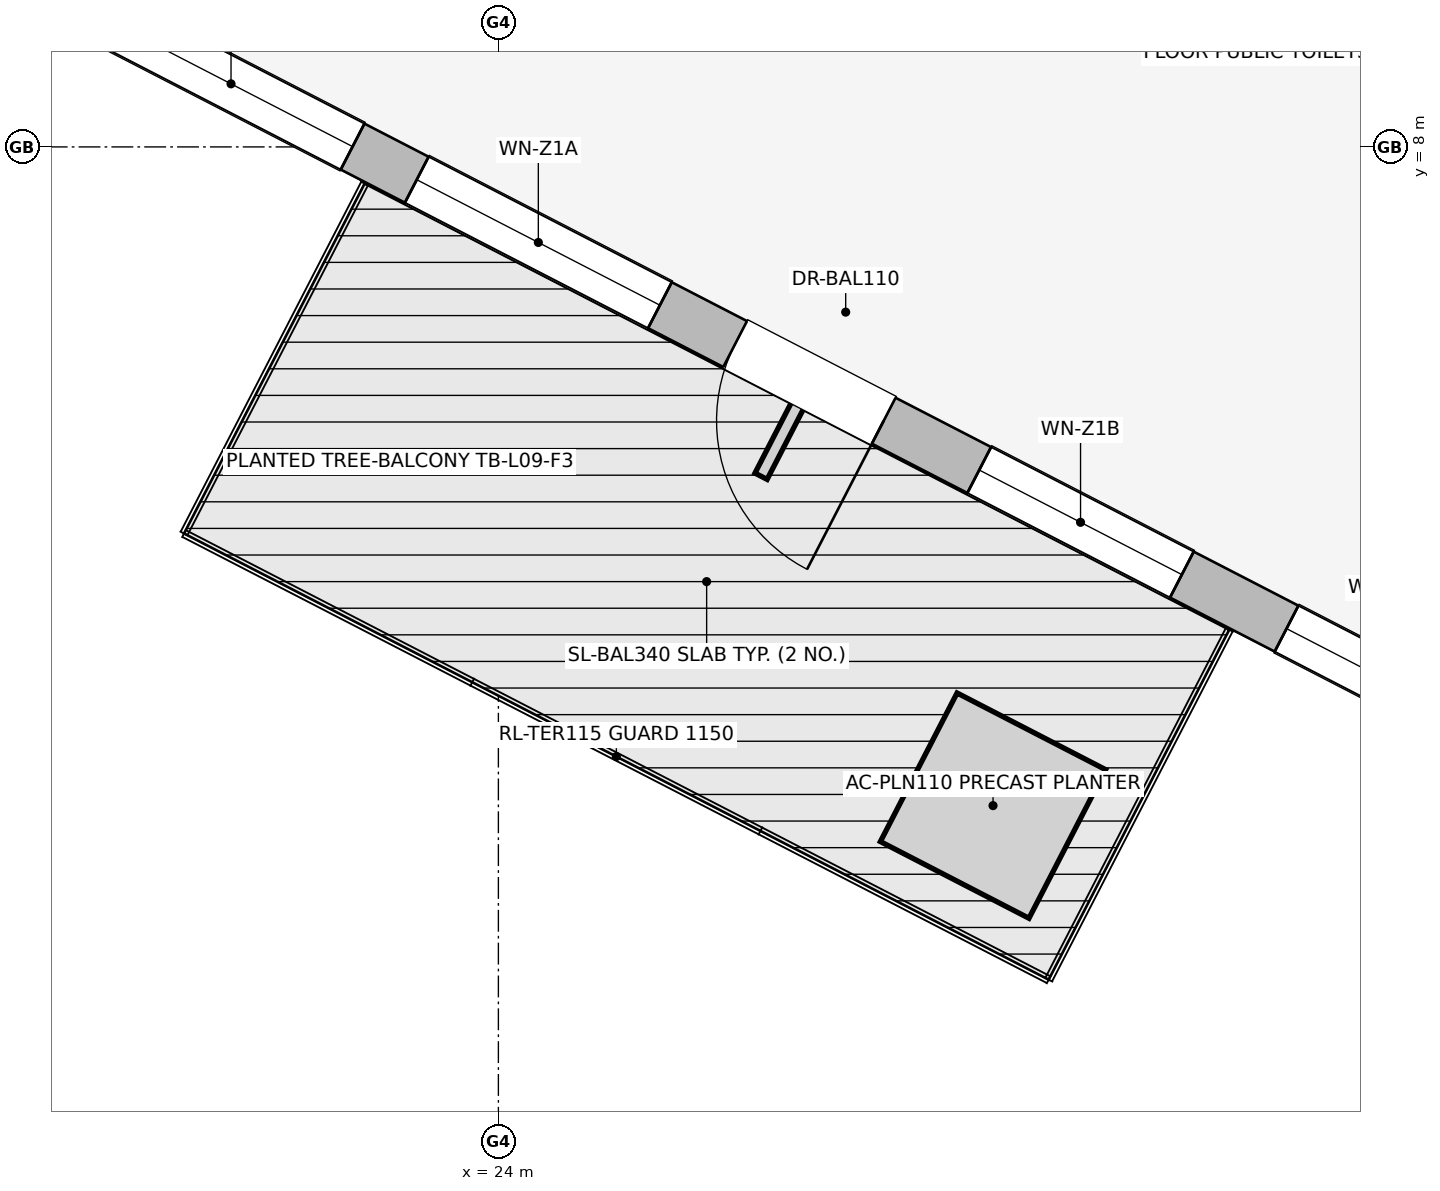
"""IFC4 building model, lengths in metres.
Left out: names, types, materials, properties, quantities, classifications, styles, units other than length and angle.
Written with IfcOpenShell. Run it as: python <this file> out.ifc"""

import sys

from ifc_helpers import new_model, si_unit, direction, frame, frame_2d, origin, place, context, subcontext, project, spatial, rectangle, extrude, element, fill, save


model = new_model("IFC4")
c1 = context("Model", 3, precision=1e-05, world=origin(), true_north=direction((0.0, 1.0)))
c2 = subcontext(c1, "Body", "Model", "MODEL_VIEW")
j1 = project(units=[si_unit("LENGTHUNIT", "METRE"), si_unit("PLANEANGLEUNIT", "RADIAN")], contexts=[c1])
p1 = place(None, origin())
s1 = spatial("IfcSite", under=j1, at=p1, CompositionType="ELEMENT")
p2 = place(p1, origin())
s2 = spatial("IfcBuilding", under=s1, at=p2, CompositionType="ELEMENT")
p3 = place(p2, frame((0.0, 0.0, 37.95)))
s3 = spatial("IfcBuildingStorey", under=s2, at=p3, CompositionType="ELEMENT", Elevation=37.95)
p4 = place(p3, frame((35.169, 1.743, 0.0), z_axis=(0.0, 0.0, 1.0), x_axis=(-0.888634413993, 0.458616264721, 0.0)))
e1 = element("IfcWall", 1, at=p4, inside=s3, PredefinedType="STANDARD", context=c2, shape_type="SweptSolid", body=[
    extrude(rectangle(XDim=20.531, YDim=0.34, at=frame_2d((10.266, 0.0))), origin(), (0.0, 0.0, 1.0), 2.684),
])
p5 = place(p4, frame((9.716, 0.0, 0.0)))
e2 = element("IfcOpeningElement", 2, at=p5, cuts=e1, PredefinedType="OPENING", context=c2, shape_type="SweptSolid", body=[
    extrude(rectangle(XDim=1.1, YDim=2.04, at=frame_2d((0.55, 1.02))), frame((0.0, 0.18, 0.0), z_axis=(0.0, -1.0, 0.0), x_axis=(1.0, 0.0, 0.0)), (0.0, 0.0, 1.0), 0.36),
])
p6 = place(p4, frame((0.902, 0.0, 0.75)))
e3 = element("IfcOpeningElement", 3, at=p6, cuts=e1, PredefinedType="OPENING", context=c2, shape_type="SweptSolid", body=[
    extrude(rectangle(XDim=1.05, YDim=1.4, at=frame_2d((0.525, 0.7))), frame((0.0, 0.18, 0.0), z_axis=(0.0, -1.0, 0.0), x_axis=(1.0, 0.0, 0.0)), (0.0, 0.0, 1.0), 0.36),
])
p7 = place(p4, frame((5.234, 0.0, 0.75)))
e4 = element("IfcOpeningElement", 4, at=p7, cuts=e1, PredefinedType="OPENING", context=c2, shape_type="SweptSolid", body=[
    extrude(rectangle(XDim=1.5, YDim=1.5, at=frame_2d((0.75, 0.75))), frame((0.0, 0.18, 0.0), z_axis=(0.0, -1.0, 0.0), x_axis=(1.0, 0.0, 0.0)), (0.0, 0.0, 1.0), 0.36),
])
p8 = place(p4, frame((7.509, 0.0, 0.75)))
e5 = element("IfcOpeningElement", 5, at=p8, cuts=e1, PredefinedType="OPENING", context=c2, shape_type="SweptSolid", body=[
    extrude(rectangle(XDim=1.5, YDim=1.5, at=frame_2d((0.75, 0.75))), frame((0.0, 0.18, 0.0), z_axis=(0.0, -1.0, 0.0), x_axis=(1.0, 0.0, 0.0)), (0.0, 0.0, 1.0), 0.36),
])
p9 = place(p4, frame((11.373, 0.0, 0.75)))
e6 = element("IfcOpeningElement", 6, at=p9, cuts=e1, PredefinedType="OPENING", context=c2, shape_type="SweptSolid", body=[
    extrude(rectangle(XDim=1.8, YDim=1.5, at=frame_2d((0.9, 0.75))), frame((0.0, 0.18, 0.0), z_axis=(0.0, -1.0, 0.0), x_axis=(1.0, 0.0, 0.0)), (0.0, 0.0, 1.0), 0.36),
])
p10 = place(p4, frame((13.648, 0.0, 0.75)))
e7 = element("IfcOpeningElement", 7, at=p10, cuts=e1, PredefinedType="OPENING", context=c2, shape_type="SweptSolid", body=[
    extrude(rectangle(XDim=1.8, YDim=1.5, at=frame_2d((0.9, 0.75))), frame((0.0, 0.18, 0.0), z_axis=(0.0, -1.0, 0.0), x_axis=(1.0, 0.0, 0.0)), (0.0, 0.0, 1.0), 0.36),
])
p11 = place(p4, frame((17.823, 0.0, 0.75)))
e8 = element("IfcOpeningElement", 8, at=p11, cuts=e1, PredefinedType="OPENING", context=c2, shape_type="SweptSolid", body=[
    extrude(rectangle(XDim=1.5, YDim=1.5, at=frame_2d((0.75, 0.75))), frame((0.0, 0.18, 0.0), z_axis=(0.0, -1.0, 0.0), x_axis=(1.0, 0.0, 0.0)), (0.0, 0.0, 1.0), 0.36),
])
p12 = place(p5, origin())
e9 = element("IfcDoor", 9, at=p12, inside=s3, OperationType="SINGLE_SWING_LEFT", PredefinedType="DOOR", context=c2, shape_type="SweptSolid", body=[
    extrude(rectangle(XDim=1.1, YDim=2.04, at=frame_2d((0.55, 1.02))), frame((0.0, 0.025, 0.0), z_axis=(0.0, -1.0, 0.0), x_axis=(1.0, 0.0, 0.0)), (0.0, 0.0, 1.0), 0.05),
])
fill(e2, e9)
p13 = place(p7, origin())
e10 = element("IfcWindow", 10, at=p13, inside=s3, PartitioningType="SINGLE_PANEL", PredefinedType="WINDOW", context=c2, shape_type="SweptSolid", body=[
    extrude(rectangle(XDim=1.5, YDim=1.5, at=frame_2d((0.75, 0.75))), frame((0.0, 0.03, 0.0), z_axis=(0.0, -1.0, 0.0), x_axis=(1.0, 0.0, 0.0)), (0.0, 0.0, 1.0), 0.06),
])
fill(e4, e10)
p14 = place(p8, origin())
e11 = element("IfcWindow", 11, at=p14, inside=s3, PartitioningType="SINGLE_PANEL", PredefinedType="WINDOW", context=c2, shape_type="SweptSolid", body=[
    extrude(rectangle(XDim=1.5, YDim=1.5, at=frame_2d((0.75, 0.75))), frame((0.0, 0.03, 0.0), z_axis=(0.0, -1.0, 0.0), x_axis=(1.0, 0.0, 0.0)), (0.0, 0.0, 1.0), 0.06),
])
fill(e5, e11)
p15 = place(p9, origin())
e12 = element("IfcWindow", 12, at=p15, inside=s3, PartitioningType="SINGLE_PANEL", PredefinedType="WINDOW", context=c2, shape_type="SweptSolid", body=[
    extrude(rectangle(XDim=1.8, YDim=1.5, at=frame_2d((0.9, 0.75))), frame((0.0, 0.03, 0.0), z_axis=(0.0, -1.0, 0.0), x_axis=(1.0, 0.0, 0.0)), (0.0, 0.0, 1.0), 0.06),
])
fill(e6, e12)
p16 = place(p10, origin())
e13 = element("IfcWindow", 13, at=p16, inside=s3, PartitioningType="SINGLE_PANEL", PredefinedType="WINDOW", context=c2, shape_type="SweptSolid", body=[
    extrude(rectangle(XDim=1.8, YDim=1.5, at=frame_2d((0.9, 0.75))), frame((0.0, 0.03, 0.0), z_axis=(0.0, -1.0, 0.0), x_axis=(1.0, 0.0, 0.0)), (0.0, 0.0, 1.0), 0.06),
])
fill(e7, e13)
save(model, sys.argv[1])
